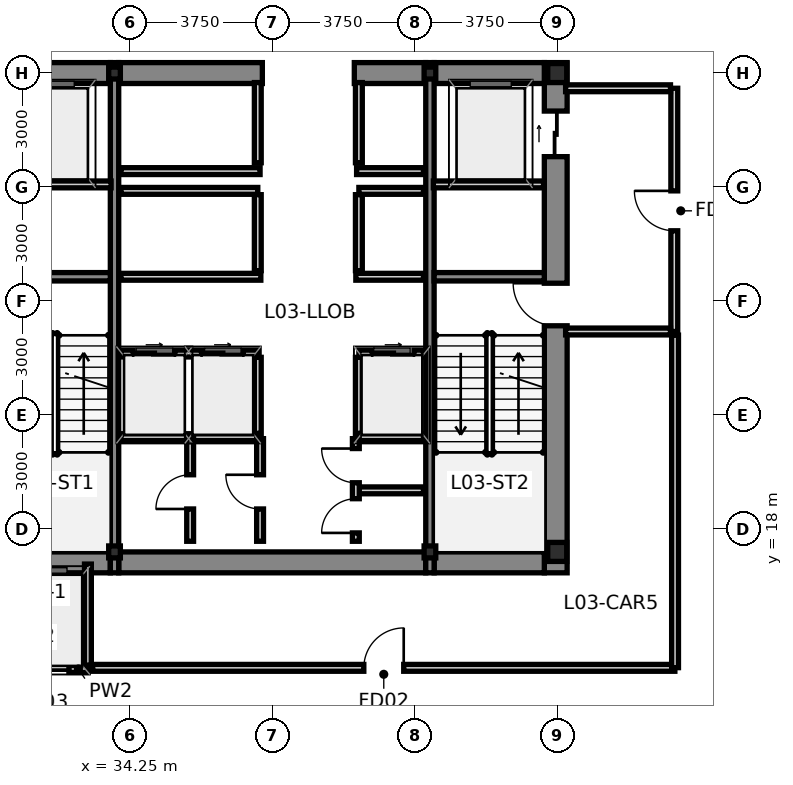
"""IFC4 building model, lengths in metres.
Left out: names, types, materials, properties, quantities, classifications, styles, units other than length and angle.
Written with IfcOpenShell. Run it as: python <this file> out.ifc"""

import sys

from ifc_helpers import new_model, si_unit, direction, frame, frame_2d, origin, origin_2d, place, context, subcontext, project, spatial, rectangle, i_section, extrude, source, transform, mapped, element, fill, save


model = new_model("IFC4")
c1 = context("Model", 3, precision=1e-05, world=origin(), true_north=direction((0.0, 1.0)))
c2 = subcontext(c1, "Body", "Model", "MODEL_VIEW")
j1 = project(units=[si_unit("LENGTHUNIT", "METRE"), si_unit("PLANEANGLEUNIT", "RADIAN")], contexts=[c1])
p1 = place(None, origin())
s1 = spatial("IfcSite", under=j1, at=p1, CompositionType="ELEMENT")
p2 = place(p1, origin())
s2 = spatial("IfcBuilding", under=s1, at=p2, CompositionType="ELEMENT")
p3 = place(p2, frame((0.0, 0.0, 14.7)))
s3 = spatial("IfcBuildingStorey", under=s2, at=p3, CompositionType="ELEMENT", Elevation=14.7)
m1 = source(origin(), c2, "Body", "SweptSolid", [
    extrude(i_section(OverallWidth=0.5, OverallDepth=0.5, WebThickness=0.028, FlangeThickness=0.04, at=origin_2d()), origin(), (0.0, 0.0, 1.0), 4.2),
])
for number, where, z_axis, x_axis in (
    (1, (45.5, 17.4, 0.0), (0.0, 0.0, 1.0), (1.0, 0.0, 0.0)),
    (2, (45.5, 30.0, 0.0), (0.0, 0.0, 1.0), (1.0, 0.0, 0.0)),
):
    element("IfcColumn", number, at=place(p3, frame(where, z_axis=z_axis, x_axis=x_axis)), inside=s3, PredefinedType="COLUMN", context=c2, shape_type="MappedRepresentation", body=[
        mapped(m1, transform((0.0, 0.0, 0.0), scale=1.0)),
    ])
m2 = source(origin(), c2, "Body", "SweptSolid", [
    extrude(i_section(OverallWidth=0.307, OverallDepth=0.315, WebThickness=0.012, FlangeThickness=0.019, at=origin_2d()), origin(), (0.0, 0.0, 1.0), 4.2),
])
for number, where, z_axis, x_axis in (
    (3, (33.85, 17.4, 0.0), (0.0, 0.0, 1.0), (1.0, 0.0, 0.0)),
    (4, (42.15, 17.4, 0.0), (0.0, 0.0, 1.0), (1.0, 0.0, 0.0)),
    (5, (33.85, 30.0, 0.0), (0.0, 0.0, 1.0), (1.0, 0.0, 0.0)),
    (6, (42.15, 30.0, 0.0), (0.0, 0.0, 1.0), (1.0, 0.0, 0.0)),
):
    element("IfcColumn", number, at=place(p3, frame(where, z_axis=z_axis, x_axis=x_axis)), inside=s3, PredefinedType="COLUMN", context=c2, shape_type="MappedRepresentation", body=[
        mapped(m2, transform((0.0, 0.0, 0.0), scale=1.0)),
    ])
p4 = place(p3, frame((45.46, 16.85, 0.0), z_axis=(0.0, 0.0, 1.0), x_axis=(0.0, 1.0, 0.0)))
e7 = element("IfcWall", 7, at=p4, inside=s3, PredefinedType="SHEAR", context=c2, shape_type="SweptSolid", body=[
    extrude(rectangle(XDim=13.425, YDim=0.6, at=frame_2d((6.712, 0.0))), origin(), (0.0, 0.0, 1.0), 4.2),
])
p5 = place(p4, frame((6.5, 0.0, 0.0)))
e8 = element("IfcOpeningElement", 8, at=p5, cuts=e7, PredefinedType="OPENING", context=c2, shape_type="SweptSolid", body=[
    extrude(rectangle(XDim=1.12, YDim=2.15, at=frame_2d((0.56, 1.075))), frame((0.0, 0.312, 0.0), z_axis=(0.0, -1.0, 0.0), x_axis=(1.0, 0.0, 0.0)), (0.0, 0.0, 1.0), 0.624),
])
p6 = place(p4, frame((10.95, 0.0, 0.0)))
e9 = element("IfcOpeningElement", 9, at=p6, cuts=e7, PredefinedType="OPENING", context=c2, shape_type="SweptSolid", body=[
    extrude(rectangle(XDim=1.2, YDim=2.2, at=frame_2d((0.6, 1.1))), frame((0.0, 0.312, 0.0), z_axis=(0.0, -1.0, 0.0), x_axis=(1.0, 0.0, 0.0)), (0.0, 0.0, 1.0), 0.624),
])
p7 = place(p3, frame((30.84, 17.125, 0.0), z_axis=(0.0, 0.0, 1.0), x_axis=(1.0, 0.0, 0.0)))
e10 = element("IfcWall", 10, at=p7, inside=s3, PredefinedType="SHEAR", context=c2, shape_type="SweptSolid", body=[
    extrude(rectangle(XDim=2.9, YDim=0.55, at=frame_2d((1.45, 0.0))), origin(), (0.0, 0.0, 1.0), 4.2),
])
p8 = place(p3, frame((33.96, 17.125, 0.0), z_axis=(0.0, 0.0, 1.0), x_axis=(1.0, 0.0, 0.0)))
e11 = element("IfcWall", 11, at=p8, inside=s3, PredefinedType="SHEAR", context=c2, shape_type="SweptSolid", body=[
    extrude(rectangle(XDim=8.08, YDim=0.55, at=frame_2d((4.04, 0.0))), origin(), (0.0, 0.0, 1.0), 4.2),
])
for number, where, z_axis, x_axis in (
    (12, (42.26, 17.125, 0.0), (0.0, 0.0, 1.0), (1.0, 0.0, 0.0)),
    (13, (30.84, 30.0, 0.0), (0.0, 0.0, 1.0), (1.0, 0.0, 0.0)),
):
    element("IfcWall", number, at=place(p3, frame(where, z_axis=z_axis, x_axis=x_axis)), inside=s3, PredefinedType="SHEAR", context=c2, shape_type="SweptSolid", body=[
        extrude(rectangle(XDim=2.9, YDim=0.55, at=frame_2d((1.45, 0.0))), origin(), (0.0, 0.0, 1.0), 4.2),
    ])
p9 = place(p3, frame((33.96, 30.0, 0.0), z_axis=(0.0, 0.0, 1.0), x_axis=(1.0, 0.0, 0.0)))
e14 = element("IfcWall", 14, at=p9, inside=s3, PredefinedType="SHEAR", context=c2, shape_type="SweptSolid", body=[
    extrude(rectangle(XDim=3.78, YDim=0.55, at=frame_2d((1.89, 0.0))), origin(), (0.0, 0.0, 1.0), 4.2),
])
p10 = place(p3, frame((40.16, 30.0, 0.0), z_axis=(0.0, 0.0, 1.0), x_axis=(1.0, 0.0, 0.0)))
e15 = element("IfcWall", 15, at=p10, inside=s3, PredefinedType="SHEAR", context=c2, shape_type="SweptSolid", body=[
    extrude(rectangle(XDim=1.88, YDim=0.55, at=frame_2d((0.94, 0.0))), origin(), (0.0, 0.0, 1.0), 4.2),
])
p11 = place(p3, frame((42.26, 30.0, 0.0), z_axis=(0.0, 0.0, 1.0), x_axis=(1.0, 0.0, 0.0)))
e16 = element("IfcWall", 16, at=p11, inside=s3, PredefinedType="SHEAR", context=c2, shape_type="SweptSolid", body=[
    extrude(rectangle(XDim=2.9, YDim=0.55, at=frame_2d((1.45, 0.0))), origin(), (0.0, 0.0, 1.0), 4.2),
])
for number, where, z_axis, x_axis in (
    (17, (33.85, 16.85, 0.0), (0.0, 0.0, 1.0), (0.0, 1.0, 0.0)),
    (18, (42.15, 16.85, 0.0), (0.0, 0.0, 1.0), (0.0, 1.0, 0.0)),
):
    element("IfcWall", number, at=place(p3, frame(where, z_axis=z_axis, x_axis=x_axis)), inside=s3, PredefinedType="SHEAR", context=c2, shape_type="SweptSolid", body=[
        extrude(rectangle(XDim=13.425, YDim=0.22, at=frame_2d((6.712, 0.0))), origin(), (0.0, 0.0, 1.0), 4.2),
    ])
for number, where, z_axis, x_axis in (
    (19, (30.84, 24.64, 0.0), (0.0, 0.0, 1.0), (1.0, 0.0, 0.0)),
    (20, (42.26, 24.64, 0.0), (0.0, 0.0, 1.0), (1.0, 0.0, 0.0)),
):
    element("IfcWall", number, at=place(p3, frame(where, z_axis=z_axis, x_axis=x_axis)), inside=s3, PredefinedType="SHEAR", context=c2, shape_type="SweptSolid", body=[
        extrude(rectangle(XDim=2.9, YDim=0.22, at=frame_2d((1.45, 0.0))), origin(), (0.0, 0.0, 1.0), 4.2),
    ])
p12 = place(p3, frame((30.85, 14.32, 0.0), z_axis=(0.0, 0.0, 1.0), x_axis=(1.0, 0.0, 0.0)))
e21 = element("IfcWall", 21, at=p12, inside=s3, PredefinedType="PARTITIONING", context=c2, shape_type="SweptSolid", body=[
    extrude(rectangle(XDim=2.3, YDim=0.18, at=frame_2d((1.15, 0.0))), origin(), (0.0, 0.0, 1.0), 3.88),
])
p13 = place(p12, frame((0.45, 0.0, 0.0)))
e22 = element("IfcOpeningElement", 22, at=p13, cuts=e21, PredefinedType="OPENING", context=c2, shape_type="SweptSolid", body=[
    extrude(rectangle(XDim=1.35, YDim=2.25, at=frame_2d((0.675, 1.125))), frame((0.0, 0.102, 0.0), z_axis=(0.0, -1.0, 0.0), x_axis=(1.0, 0.0, 0.0)), (0.0, 0.0, 1.0), 0.204),
])
p14 = place(p3, frame((33.15, 14.42, 0.0), z_axis=(0.0, 0.0, 1.0), x_axis=(0.0, 1.0, 0.0)))
e23 = element("IfcWall", 23, at=p14, inside=s3, PredefinedType="PARTITIONING", context=c2, shape_type="SweptSolid", body=[
    extrude(rectangle(XDim=2.66, YDim=0.18, at=frame_2d((1.33, 0.0))), origin(), (0.0, 0.0, 1.0), 3.88),
])
p15 = place(p3, frame((34.02, 22.62, 0.0), z_axis=(0.0, 0.0, 1.0), x_axis=(1.0, 0.0, 0.0)))
e24 = element("IfcWall", 24, at=p15, inside=s3, PredefinedType="PARTITIONING", context=c2, shape_type="SweptSolid", body=[
    extrude(rectangle(XDim=3.6, YDim=0.18, at=frame_2d((1.8, 0.0))), origin(), (0.0, 0.0, 1.0), 3.88),
])
p16 = place(p15, frame((0.32, 0.0, 0.0)))
e25 = element("IfcOpeningElement", 25, at=p16, cuts=e24, PredefinedType="OPENING", context=c2, shape_type="SweptSolid", body=[
    extrude(rectangle(XDim=1.1, YDim=2.2, at=frame_2d((0.55, 1.1))), frame((0.0, 0.102, 0.0), z_axis=(0.0, -1.0, 0.0), x_axis=(1.0, 0.0, 0.0)), (0.0, 0.0, 1.0), 0.204),
])
p17 = place(p15, frame((2.12, 0.0, 0.0)))
e26 = element("IfcOpeningElement", 26, at=p17, cuts=e24, PredefinedType="OPENING", context=c2, shape_type="SweptSolid", body=[
    extrude(rectangle(XDim=1.1, YDim=2.2, at=frame_2d((0.55, 1.1))), frame((0.0, 0.102, 0.0), z_axis=(0.0, -1.0, 0.0), x_axis=(1.0, 0.0, 0.0)), (0.0, 0.0, 1.0), 0.204),
])
p18 = place(p3, frame((40.28, 22.62, 0.0), z_axis=(0.0, 0.0, 1.0), x_axis=(1.0, 0.0, 0.0)))
e27 = element("IfcWall", 27, at=p18, inside=s3, PredefinedType="PARTITIONING", context=c2, shape_type="SweptSolid", body=[
    extrude(rectangle(XDim=1.7, YDim=0.18, at=frame_2d((0.85, 0.0))), origin(), (0.0, 0.0, 1.0), 3.88),
])
p19 = place(p18, frame((0.35, 0.0, 0.0)))
e28 = element("IfcOpeningElement", 28, at=p19, cuts=e27, PredefinedType="OPENING", context=c2, shape_type="SweptSolid", body=[
    extrude(rectangle(XDim=1.1, YDim=2.2, at=frame_2d((0.55, 1.1))), frame((0.0, 0.102, 0.0), z_axis=(0.0, -1.0, 0.0), x_axis=(1.0, 0.0, 0.0)), (0.0, 0.0, 1.0), 0.204),
])
for number, where, z_axis, x_axis in (
    (29, (37.62, 20.52, 0.0), (0.0, 0.0, 1.0), (0.0, 1.0, 0.0)),
    (30, (40.28, 20.52, 0.0), (0.0, 0.0, 1.0), (0.0, 1.0, 0.0)),
):
    element("IfcWall", number, at=place(p3, frame(where, z_axis=z_axis, x_axis=x_axis)), inside=s3, PredefinedType="PARTITIONING", context=c2, shape_type="SweptSolid", body=[
        extrude(rectangle(XDim=2.0, YDim=0.18, at=frame_2d((1.0, 0.0))), origin(), (0.0, 0.0, 1.0), 3.88),
    ])
p20 = place(p3, frame((34.02, 26.9, 0.0), z_axis=(0.0, 0.0, 1.0), x_axis=(1.0, 0.0, 0.0)))
e31 = element("IfcWall", 31, at=p20, inside=s3, PredefinedType="PARTITIONING", context=c2, shape_type="SweptSolid", body=[
    extrude(rectangle(XDim=3.6, YDim=0.18, at=frame_2d((1.8, 0.0))), origin(), (0.0, 0.0, 1.0), 3.88),
])
p21 = place(p3, frame((40.28, 26.9, 0.0), z_axis=(0.0, 0.0, 1.0), x_axis=(1.0, 0.0, 0.0)))
e32 = element("IfcWall", 32, at=p21, inside=s3, PredefinedType="PARTITIONING", context=c2, shape_type="SweptSolid", body=[
    extrude(rectangle(XDim=1.7, YDim=0.18, at=frame_2d((0.85, 0.0))), origin(), (0.0, 0.0, 1.0), 3.88),
])
for number, where, z_axis, x_axis in (
    (33, (37.62, 24.8, 0.0), (0.0, 0.0, 1.0), (0.0, 1.0, 0.0)),
    (34, (40.28, 24.8, 0.0), (0.0, 0.0, 1.0), (0.0, 1.0, 0.0)),
):
    element("IfcWall", number, at=place(p3, frame(where, z_axis=z_axis, x_axis=x_axis)), inside=s3, PredefinedType="PARTITIONING", context=c2, shape_type="SweptSolid", body=[
        extrude(rectangle(XDim=2.0, YDim=0.18, at=frame_2d((1.0, 0.0))), origin(), (0.0, 0.0, 1.0), 3.88),
    ])
p22 = place(p3, frame((34.02, 24.64, 0.0), z_axis=(0.0, 0.0, 1.0), x_axis=(1.0, 0.0, 0.0)))
e35 = element("IfcWall", 35, at=p22, inside=s3, PredefinedType="PARTITIONING", context=c2, shape_type="SweptSolid", body=[
    extrude(rectangle(XDim=3.68, YDim=0.18, at=frame_2d((1.84, 0.0))), origin(), (0.0, 0.0, 1.0), 3.88),
])
p23 = place(p3, frame((40.2, 24.64, 0.0), z_axis=(0.0, 0.0, 1.0), x_axis=(1.0, 0.0, 0.0)))
e36 = element("IfcWall", 36, at=p23, inside=s3, PredefinedType="PARTITIONING", context=c2, shape_type="SweptSolid", body=[
    extrude(rectangle(XDim=1.78, YDim=0.18, at=frame_2d((0.89, 0.0))), origin(), (0.0, 0.0, 1.0), 3.88),
])
p24 = place(p3, frame((34.02, 27.42, 0.0), z_axis=(0.0, 0.0, 1.0), x_axis=(1.0, 0.0, 0.0)))
e37 = element("IfcWall", 37, at=p24, inside=s3, PredefinedType="PARTITIONING", context=c2, shape_type="SweptSolid", body=[
    extrude(rectangle(XDim=3.66, YDim=0.18, at=frame_2d((1.83, 0.0))), origin(), (0.0, 0.0, 1.0), 3.88),
])
p25 = place(p3, frame((40.22, 27.42, 0.0), z_axis=(0.0, 0.0, 1.0), x_axis=(1.0, 0.0, 0.0)))
e38 = element("IfcWall", 38, at=p25, inside=s3, PredefinedType="PARTITIONING", context=c2, shape_type="SweptSolid", body=[
    extrude(rectangle(XDim=1.76, YDim=0.18, at=frame_2d((0.88, 0.0))), origin(), (0.0, 0.0, 1.0), 3.88),
])
for number, where, z_axis, x_axis in (
    (39, (37.62, 27.64, 0.0), (0.0, 0.0, 1.0), (0.0, 1.0, 0.0)),
    (40, (40.28, 27.64, 0.0), (0.0, 0.0, 1.0), (0.0, 1.0, 0.0)),
):
    element("IfcWall", number, at=place(p3, frame(where, z_axis=z_axis, x_axis=x_axis)), inside=s3, PredefinedType="PARTITIONING", context=c2, shape_type="SweptSolid", body=[
        extrude(rectangle(XDim=2.11, YDim=0.18, at=frame_2d((1.055, 0.0))), origin(), (0.0, 0.0, 1.0), 3.88),
    ])
p26 = place(p3, frame((48.58, 23.2, 0.0), z_axis=(0.0, 0.0, 1.0), x_axis=(0.0, 1.0, 0.0)))
e41 = element("IfcWall", 41, at=p26, inside=s3, PredefinedType="PARTITIONING", context=c2, shape_type="SweptSolid", body=[
    extrude(rectangle(XDim=6.4, YDim=0.18, at=frame_2d((3.2, 0.0))), origin(), (0.0, 0.0, 1.0), 3.88),
])
p27 = place(p26, frame((2.65, 0.0, 0.0)))
e42 = element("IfcOpeningElement", 42, at=p27, cuts=e41, PredefinedType="OPENING", context=c2, shape_type="SweptSolid", body=[
    extrude(rectangle(XDim=1.05, YDim=2.15, at=frame_2d((0.525, 1.075))), frame((0.0, 0.102, 0.0), z_axis=(0.0, -1.0, 0.0), x_axis=(1.0, 0.0, 0.0)), (0.0, 0.0, 1.0), 0.204),
])
p28 = place(p3, frame((45.72, 23.2, 0.0), z_axis=(0.0, 0.0, 1.0), x_axis=(1.0, 0.0, 0.0)))
e43 = element("IfcWall", 43, at=p28, inside=s3, PredefinedType="PARTITIONING", context=c2, shape_type="SweptSolid", body=[
    extrude(rectangle(XDim=2.76, YDim=0.18, at=frame_2d((1.38, 0.0))), origin(), (0.0, 0.0, 1.0), 3.88),
])
p29 = place(p3, frame((45.72, 29.6, 0.0), z_axis=(0.0, 0.0, 1.0), x_axis=(1.0, 0.0, 0.0)))
e44 = element("IfcWall", 44, at=p29, inside=s3, PredefinedType="PARTITIONING", context=c2, shape_type="SweptSolid", body=[
    extrude(rectangle(XDim=2.76, YDim=0.18, at=frame_2d((1.38, 0.0))), origin(), (0.0, 0.0, 1.0), 3.253),
])
for number, where, z_axis, x_axis in (
    (45, (30.86, 27.07, 0.0), (0.0, 0.0, 1.0), (1.0, 0.0, 0.0)),
    (46, (42.24, 27.07, 0.0), (0.0, 0.0, 1.0), (1.0, 0.0, 0.0)),
):
    element("IfcWall", number, at=place(p3, frame(where, z_axis=z_axis, x_axis=x_axis)), inside=s3, PredefinedType="PARTITIONING", context=c2, shape_type="SweptSolid", body=[
        extrude(rectangle(XDim=2.9, YDim=0.18, at=frame_2d((1.45, 0.0))), origin(), (0.0, 0.0, 1.0), 3.88),
    ])
p30 = place(p3, frame((34.02, 20.42, 0.0), z_axis=(0.0, 0.0, 1.0), x_axis=(1.0, 0.0, 0.0)))
e47 = element("IfcWall", 47, at=p30, inside=s3, PredefinedType="PARTITIONING", context=c2, shape_type="SweptSolid", body=[
    extrude(rectangle(XDim=3.64, YDim=0.18, at=frame_2d((1.82, 0.0))), origin(), (0.0, 0.0, 1.0), 3.88),
])
p31 = place(p3, frame((40.22, 20.42, 0.0), z_axis=(0.0, 0.0, 1.0), x_axis=(1.0, 0.0, 0.0)))
e48 = element("IfcWall", 48, at=p31, inside=s3, PredefinedType="PARTITIONING", context=c2, shape_type="SweptSolid", body=[
    extrude(rectangle(XDim=1.76, YDim=0.18, at=frame_2d((0.88, 0.0))), origin(), (0.0, 0.0, 1.0), 3.88),
])
p32 = place(p3, frame((35.84, 17.68, 0.0), z_axis=(0.0, 0.0, 1.0), x_axis=(0.0, 1.0, 0.0)))
e49 = element("IfcWall", 49, at=p32, inside=s3, PredefinedType="PARTITIONING", context=c2, shape_type="SweptSolid", body=[
    extrude(rectangle(XDim=2.7, YDim=0.18, at=frame_2d((1.35, 0.0))), origin(), (0.0, 0.0, 1.0), 3.88),
])
p33 = place(p32, frame((0.85, 0.0, 0.0)))
e50 = element("IfcOpeningElement", 50, at=p33, cuts=e49, PredefinedType="OPENING", context=c2, shape_type="SweptSolid", body=[
    extrude(rectangle(XDim=0.9, YDim=2.1, at=frame_2d((0.45, 1.05))), frame((0.0, 0.102, 0.0), z_axis=(0.0, -1.0, 0.0), x_axis=(1.0, 0.0, 0.0)), (0.0, 0.0, 1.0), 0.204),
])
p34 = place(p3, frame((37.68, 17.68, 0.0), z_axis=(0.0, 0.0, 1.0), x_axis=(0.0, 1.0, 0.0)))
e51 = element("IfcWall", 51, at=p34, inside=s3, PredefinedType="PARTITIONING", context=c2, shape_type="SweptSolid", body=[
    extrude(rectangle(XDim=2.7, YDim=0.18, at=frame_2d((1.35, 0.0))), origin(), (0.0, 0.0, 1.0), 3.88),
])
p35 = place(p34, frame((0.85, 0.0, 0.0)))
e52 = element("IfcOpeningElement", 52, at=p35, cuts=e51, PredefinedType="OPENING", context=c2, shape_type="SweptSolid", body=[
    extrude(rectangle(XDim=0.9, YDim=2.1, at=frame_2d((0.45, 1.05))), frame((0.0, 0.102, 0.0), z_axis=(0.0, -1.0, 0.0), x_axis=(1.0, 0.0, 0.0)), (0.0, 0.0, 1.0), 0.204),
])
p36 = place(p3, frame((40.28, 19.02, 0.0), z_axis=(0.0, 0.0, 1.0), x_axis=(1.0, 0.0, 0.0)))
e53 = element("IfcWall", 53, at=p36, inside=s3, PredefinedType="PARTITIONING", context=c2, shape_type="SweptSolid", body=[
    extrude(rectangle(XDim=1.7, YDim=0.18, at=frame_2d((0.85, 0.0))), origin(), (0.0, 0.0, 1.0), 3.88),
])
p37 = place(p3, frame((40.2, 17.68, 0.0), z_axis=(0.0, 0.0, 1.0), x_axis=(0.0, 1.0, 0.0)))
e54 = element("IfcWall", 54, at=p37, inside=s3, PredefinedType="PARTITIONING", context=c2, shape_type="SweptSolid", body=[
    extrude(rectangle(XDim=2.7, YDim=0.18, at=frame_2d((1.35, 0.0))), origin(), (0.0, 0.0, 1.0), 3.88),
])
p38 = place(p37, frame((0.22, 0.0, 0.0)))
e55 = element("IfcOpeningElement", 55, at=p38, cuts=e54, PredefinedType="OPENING", context=c2, shape_type="SweptSolid", body=[
    extrude(rectangle(XDim=0.9, YDim=2.1, at=frame_2d((0.45, 1.05))), frame((0.0, 0.102, 0.0), z_axis=(0.0, -1.0, 0.0), x_axis=(1.0, 0.0, 0.0)), (0.0, 0.0, 1.0), 0.204),
])
p39 = place(p37, frame((1.54, 0.0, 0.0)))
e56 = element("IfcOpeningElement", 56, at=p39, cuts=e54, PredefinedType="OPENING", context=c2, shape_type="SweptSolid", body=[
    extrude(rectangle(XDim=0.9, YDim=2.1, at=frame_2d((0.45, 1.05))), frame((0.0, 0.102, 0.0), z_axis=(0.0, -1.0, 0.0), x_axis=(1.0, 0.0, 0.0)), (0.0, 0.0, 1.0), 0.204),
])
p40 = place(p3, frame((33.275, 14.35, 0.0), z_axis=(0.0, 0.0, 1.0), x_axis=(1.0, 0.0, 0.0)))
e57 = element("IfcWall", 57, at=p40, inside=s3, PredefinedType="PARTITIONING", context=c2, shape_type="SweptSolid", body=[
    extrude(rectangle(XDim=15.32, YDim=0.18, at=frame_2d((7.66, 0.0))), origin(), (0.0, 0.0, 1.0), 3.88),
])
p41 = place(p40, frame((7.135, 0.0, 0.0)))
e58 = element("IfcOpeningElement", 58, at=p41, cuts=e57, PredefinedType="OPENING", context=c2, shape_type="SweptSolid", body=[
    extrude(rectangle(XDim=1.05, YDim=2.15, at=frame_2d((0.525, 1.075))), frame((0.0, 0.102, 0.0), z_axis=(0.0, -1.0, 0.0), x_axis=(1.0, 0.0, 0.0)), (0.0, 0.0, 1.0), 0.204),
])
p42 = place(p3, frame((48.6, 14.355, 0.0), z_axis=(0.0, 0.0, 1.0), x_axis=(0.0, 1.0, 0.0)))
e59 = element("IfcWall", 59, at=p42, inside=s3, PredefinedType="PARTITIONING", context=c2, shape_type="SweptSolid", body=[
    extrude(rectangle(XDim=8.75, YDim=0.18, at=frame_2d((4.375, 0.0))), origin(), (0.0, 0.0, 1.0), 3.88),
])
p43 = place(p5, origin())
e60 = element("IfcDoor", 60, at=p43, inside=s3, OperationType="SINGLE_SWING_RIGHT", PredefinedType="DOOR", context=c2, shape_type="SweptSolid", body=[
    extrude(rectangle(XDim=1.12, YDim=2.15, at=frame_2d((0.56, 1.075))), frame((0.0, 0.025, 0.0), z_axis=(0.0, -1.0, 0.0), x_axis=(1.0, 0.0, 0.0)), (0.0, 0.0, 1.0), 0.05),
])
fill(e8, e60)
p44 = place(p6, origin())
e61 = element("IfcDoor", 61, at=p44, inside=s3, OperationType="SLIDING_TO_RIGHT", PredefinedType="DOOR", context=c2, shape_type="SweptSolid", body=[
    extrude(rectangle(XDim=1.2, YDim=2.2, at=frame_2d((0.6, 1.1))), frame((0.0, 0.025, 0.0), z_axis=(0.0, -1.0, 0.0), x_axis=(1.0, 0.0, 0.0)), (0.0, 0.0, 1.0), 0.05),
])
fill(e9, e61)
p45 = place(p13, origin())
e62 = element("IfcDoor", 62, at=p45, inside=s3, OperationType="SLIDING_TO_LEFT", PredefinedType="DOOR", context=c2, shape_type="SweptSolid", body=[
    extrude(rectangle(XDim=1.35, YDim=2.25, at=frame_2d((0.675, 1.125))), frame((0.0, 0.025, 0.0), z_axis=(0.0, -1.0, 0.0), x_axis=(1.0, 0.0, 0.0)), (0.0, 0.0, 1.0), 0.05),
])
fill(e22, e62)
p46 = place(p16, origin())
e63 = element("IfcDoor", 63, at=p46, inside=s3, OperationType="SLIDING_TO_LEFT", PredefinedType="DOOR", context=c2, shape_type="SweptSolid", body=[
    extrude(rectangle(XDim=1.1, YDim=2.2, at=frame_2d((0.55, 1.1))), frame((0.0, 0.025, 0.0), z_axis=(0.0, -1.0, 0.0), x_axis=(1.0, 0.0, 0.0)), (0.0, 0.0, 1.0), 0.05),
])
fill(e25, e63)
p47 = place(p17, origin())
e64 = element("IfcDoor", 64, at=p47, inside=s3, OperationType="SLIDING_TO_RIGHT", PredefinedType="DOOR", context=c2, shape_type="SweptSolid", body=[
    extrude(rectangle(XDim=1.1, YDim=2.2, at=frame_2d((0.55, 1.1))), frame((0.0, 0.025, 0.0), z_axis=(0.0, -1.0, 0.0), x_axis=(1.0, 0.0, 0.0)), (0.0, 0.0, 1.0), 0.05),
])
fill(e26, e64)
p48 = place(p19, origin())
e65 = element("IfcDoor", 65, at=p48, inside=s3, OperationType="SLIDING_TO_LEFT", PredefinedType="DOOR", context=c2, shape_type="SweptSolid", body=[
    extrude(rectangle(XDim=1.1, YDim=2.2, at=frame_2d((0.55, 1.1))), frame((0.0, 0.025, 0.0), z_axis=(0.0, -1.0, 0.0), x_axis=(1.0, 0.0, 0.0)), (0.0, 0.0, 1.0), 0.05),
])
fill(e28, e65)
p49 = place(p27, origin())
e66 = element("IfcDoor", 66, at=p49, inside=s3, OperationType="SINGLE_SWING_RIGHT", PredefinedType="DOOR", context=c2, shape_type="SweptSolid", body=[
    extrude(rectangle(XDim=1.05, YDim=2.15, at=frame_2d((0.525, 1.075))), frame((0.0, 0.025, 0.0), z_axis=(0.0, -1.0, 0.0), x_axis=(1.0, 0.0, 0.0)), (0.0, 0.0, 1.0), 0.05),
])
fill(e42, e66)
p50 = place(p33, origin())
e67 = element("IfcDoor", 67, at=p50, inside=s3, OperationType="SINGLE_SWING_LEFT", PredefinedType="DOOR", context=c2, shape_type="SweptSolid", body=[
    extrude(rectangle(XDim=0.9, YDim=2.1, at=frame_2d((0.45, 1.05))), frame((0.0, 0.025, 0.0), z_axis=(0.0, -1.0, 0.0), x_axis=(1.0, 0.0, 0.0)), (0.0, 0.0, 1.0), 0.05),
])
fill(e50, e67)
p51 = place(p35, origin())
e68 = element("IfcDoor", 68, at=p51, inside=s3, OperationType="SINGLE_SWING_RIGHT", PredefinedType="DOOR", context=c2, shape_type="SweptSolid", body=[
    extrude(rectangle(XDim=0.9, YDim=2.1, at=frame_2d((0.45, 1.05))), frame((0.0, 0.025, 0.0), z_axis=(0.0, -1.0, 0.0), x_axis=(1.0, 0.0, 0.0)), (0.0, 0.0, 1.0), 0.05),
])
fill(e52, e68)
p52 = place(p38, origin())
e69 = element("IfcDoor", 69, at=p52, inside=s3, OperationType="SINGLE_SWING_LEFT", PredefinedType="DOOR", context=c2, shape_type="SweptSolid", body=[
    extrude(rectangle(XDim=0.9, YDim=2.1, at=frame_2d((0.45, 1.05))), frame((0.0, 0.025, 0.0), z_axis=(0.0, -1.0, 0.0), x_axis=(1.0, 0.0, 0.0)), (0.0, 0.0, 1.0), 0.05),
])
fill(e55, e69)
p53 = place(p39, origin())
e70 = element("IfcDoor", 70, at=p53, inside=s3, OperationType="SINGLE_SWING_RIGHT", PredefinedType="DOOR", context=c2, shape_type="SweptSolid", body=[
    extrude(rectangle(XDim=0.9, YDim=2.1, at=frame_2d((0.45, 1.05))), frame((0.0, 0.025, 0.0), z_axis=(0.0, -1.0, 0.0), x_axis=(1.0, 0.0, 0.0)), (0.0, 0.0, 1.0), 0.05),
])
fill(e56, e70)
p54 = place(p41, origin())
e71 = element("IfcDoor", 71, at=p54, inside=s3, OperationType="SINGLE_SWING_RIGHT", PredefinedType="DOOR", context=c2, shape_type="SweptSolid", body=[
    extrude(rectangle(XDim=1.05, YDim=2.15, at=frame_2d((0.525, 1.075))), frame((0.0, 0.025, 0.0), z_axis=(0.0, -1.0, 0.0), x_axis=(1.0, 0.0, 0.0)), (0.0, 0.0, 1.0), 0.05),
])
fill(e58, e71)
save(model, sys.argv[1])
